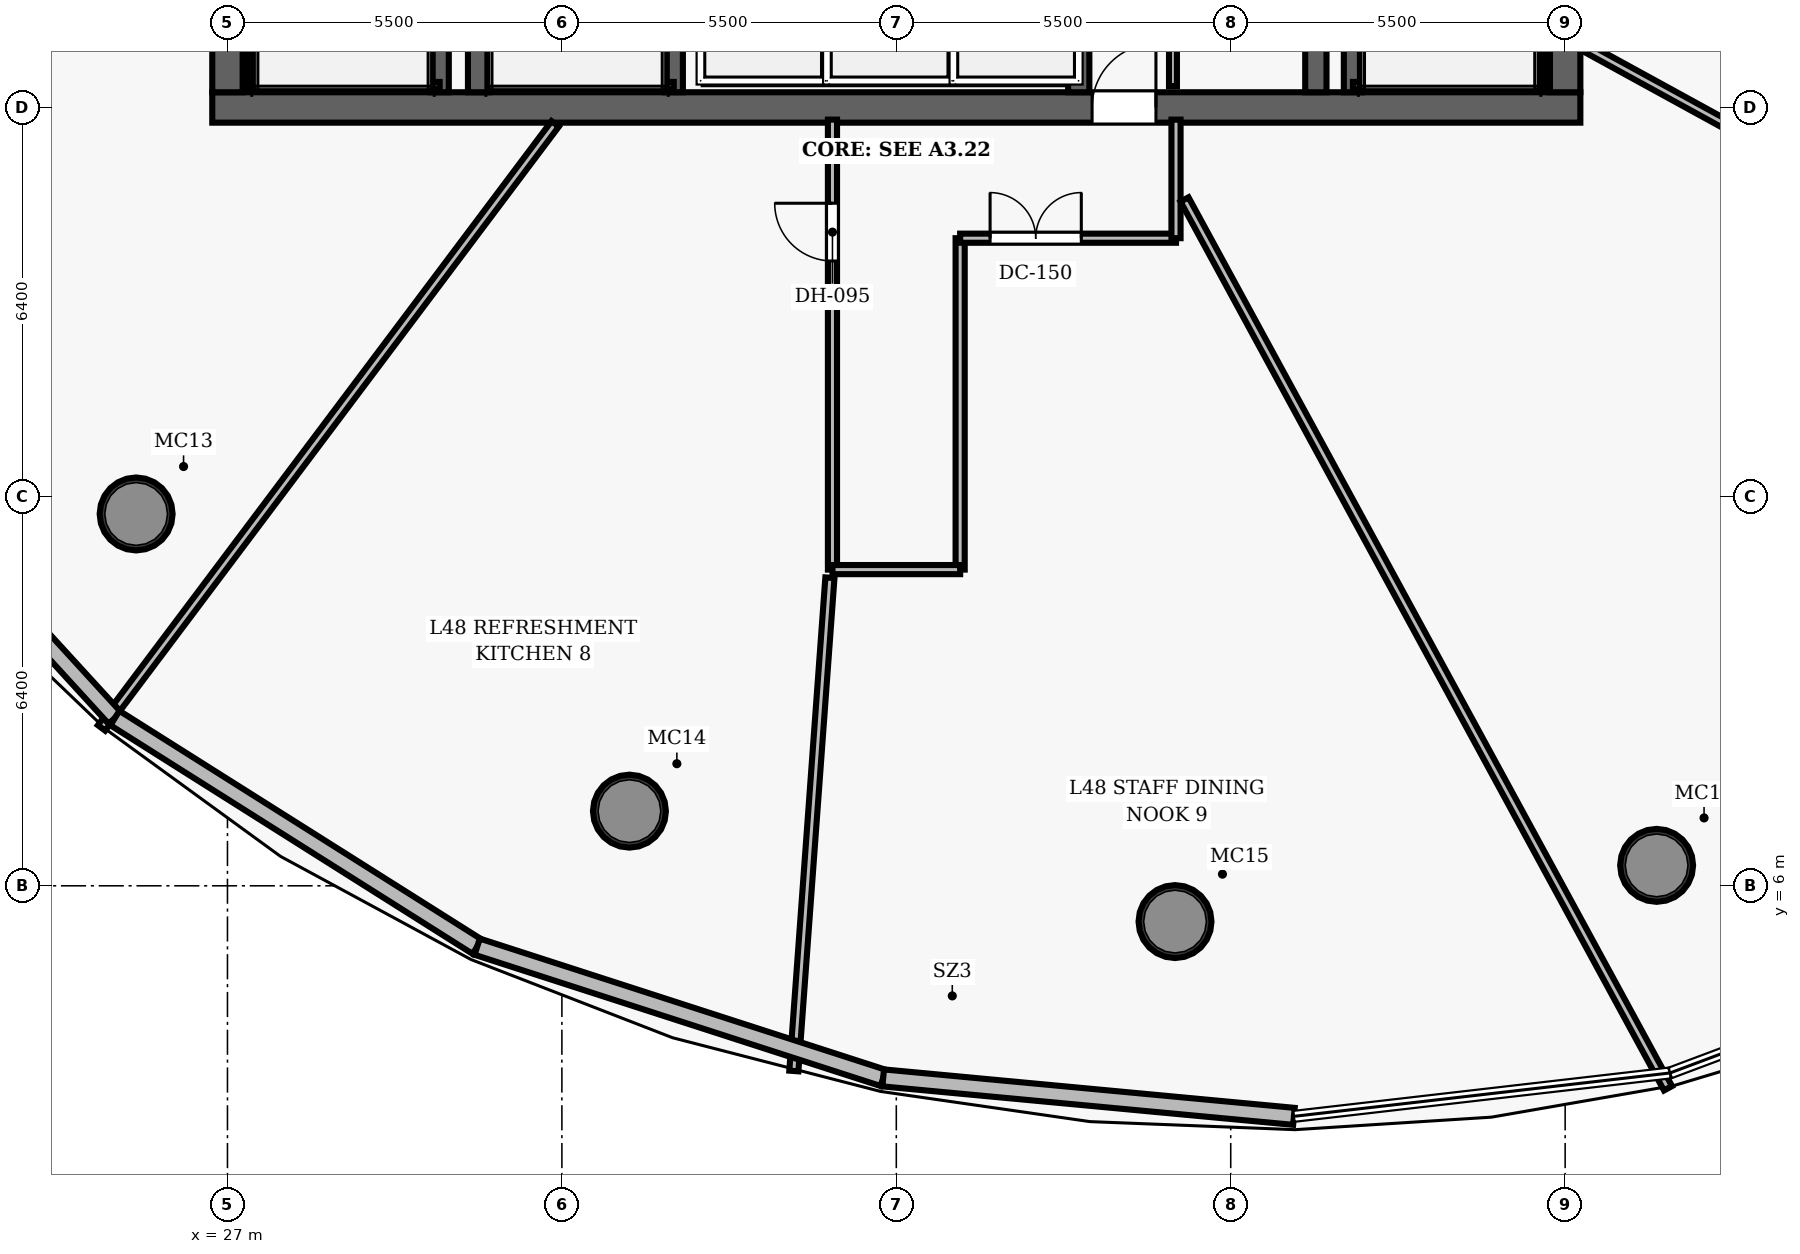
"""IFC4 building model, lengths in metres.
Left out: names, types, materials, properties, quantities, classifications, styles, units other than length and angle.
Written with IfcOpenShell. Run it as: python <this file> out.ifc"""

import sys

from ifc_helpers import new_model, si_unit, direction, frame, frame_2d, origin, origin_2d, place, context, subcontext, project, spatial, rectangle, hollow_circle, extrude, element, fill, save


model = new_model("IFC4")
c1 = context("Model", 3, precision=1e-05, world=origin(), true_north=direction((0.0, 1.0)))
c2 = subcontext(c1, "Body", "Model", "MODEL_VIEW")
j1 = project(units=[si_unit("LENGTHUNIT", "METRE"), si_unit("PLANEANGLEUNIT", "RADIAN")], contexts=[c1])
p1 = place(None, origin())
s1 = spatial("IfcSite", under=j1, at=p1, CompositionType="ELEMENT")
p2 = place(p1, origin())
s2 = spatial("IfcBuilding", under=s1, at=p2, CompositionType="ELEMENT")
p3 = place(p2, frame((0.0, 0.0, 190.45)))
s3 = spatial("IfcBuildingStorey", under=s2, at=p3, CompositionType="ELEMENT", Elevation=190.45)
p4 = place(p3, frame((26.75, 18.8, 0.0), z_axis=(0.0, 0.0, 1.0), x_axis=(1.0, 0.0, 0.0)))
e1 = element("IfcWall", 1, at=p4, inside=s3, PredefinedType="SHEAR", context=c2, shape_type="SweptSolid", body=[
    extrude(rectangle(XDim=22.5, YDim=0.5, at=frame_2d((11.25, 0.0))), origin(), (0.0, 0.0, 1.0), 3.85),
])
p5 = place(p4, frame((14.47, 0.0, 0.0)))
e2 = element("IfcOpeningElement", 2, at=p5, cuts=e1, PredefinedType="OPENING", context=c2, shape_type="SweptSolid", body=[
    extrude(rectangle(XDim=1.05, YDim=2.15, at=frame_2d((0.525, 1.075))), frame((0.0, 0.26, 0.0), z_axis=(0.0, -1.0, 0.0), x_axis=(1.0, 0.0, 0.0)), (0.0, 0.0, 1.0), 0.52),
])
p6 = place(p3, frame((27.0, 19.05, 0.0), z_axis=(0.0, 0.0, 1.0), x_axis=(0.0, 1.0, 0.0)))
e3 = element("IfcWall", 3, at=p6, inside=s3, PredefinedType="SHEAR", context=c2, shape_type="SweptSolid", body=[
    extrude(rectangle(XDim=13.9, YDim=0.5, at=frame_2d((6.95, 0.0))), origin(), (0.0, 0.0, 1.0), 3.85),
])
p7 = place(p6, frame((8.2, 0.0, 0.0)))
e4 = element("IfcOpeningElement", 4, at=p7, cuts=e3, PredefinedType="OPENING", context=c2, shape_type="SweptSolid", body=[
    extrude(rectangle(XDim=1.05, YDim=2.15, at=frame_2d((0.525, 1.075))), frame((0.0, 0.26, 0.0), z_axis=(0.0, -1.0, 0.0), x_axis=(1.0, 0.0, 0.0)), (0.0, 0.0, 1.0), 0.52),
])
p8 = place(p3, frame((49.0, 19.05, 0.0), z_axis=(0.0, 0.0, 1.0), x_axis=(0.0, 1.0, 0.0)))
e5 = element("IfcWall", 5, at=p8, inside=s3, PredefinedType="SHEAR", context=c2, shape_type="SweptSolid", body=[
    extrude(rectangle(XDim=13.9, YDim=0.5, at=frame_2d((6.95, 0.0))), origin(), (0.0, 0.0, 1.0), 3.85),
])
p9 = place(p8, frame((8.2, 0.0, 0.0)))
e6 = element("IfcOpeningElement", 6, at=p9, cuts=e5, PredefinedType="OPENING", context=c2, shape_type="SweptSolid", body=[
    extrude(rectangle(XDim=1.05, YDim=2.15, at=frame_2d((0.525, 1.075))), frame((0.0, 0.26, 0.0), z_axis=(0.0, -1.0, 0.0), x_axis=(1.0, 0.0, 0.0)), (0.0, 0.0, 1.0), 0.52),
])
for number, where, z_axis, x_axis in (
    (7, (31.13, 19.05, 0.0), (0.0, 0.0, 1.0), (0.0, 1.0, 0.0)),
    (8, (44.9, 19.05, 0.0), (0.0, 0.0, 1.0), (0.0, 1.0, 0.0)),
):
    element("IfcWall", number, at=place(p3, frame(where, z_axis=z_axis, x_axis=x_axis)), inside=s3, PredefinedType="SHEAR", context=c2, shape_type="SweptSolid", body=[
        extrude(rectangle(XDim=13.9, YDim=0.35, at=frame_2d((6.95, 0.0))), origin(), (0.0, 0.0, 1.0), 3.85),
    ])
for number, where, z_axis, x_axis in (
    (9, (25.498, 12.115, 0.0), (0.0, 0.0, 1.0), (1.0, 0.0, 0.0)),
    (10, (33.611, 7.228, 0.0), (0.0, 0.0, 1.0), (1.0, 0.0, 0.0)),
    (11, (42.584, 5.412, 0.0), (0.0, 0.0, 1.0), (1.0, 0.0, 0.0)),
    (12, (50.504, 6.336, 0.0), (0.0, 0.0, 1.0), (1.0, 0.0, 0.0)),
):
    element("IfcColumn", number, at=place(p3, frame(where, z_axis=z_axis, x_axis=x_axis)), inside=s3, PredefinedType="COLUMN", context=c2, shape_type="SweptSolid", body=[
        extrude(hollow_circle(Radius=0.6, WallThickness=0.05, at=origin_2d()), origin(), (0.0, 0.0, 1.0), 3.85),
    ])
p10 = place(p3, frame((30.49, 19.05, 0.0), z_axis=(0.0, 0.0, 1.0), x_axis=(0.0, 1.0, 0.0)))
e13 = element("IfcWall", 13, at=p10, inside=s3, PredefinedType="SHEAR", context=c2, shape_type="SweptSolid", body=[
    extrude(rectangle(XDim=7.5, YDim=0.3, at=frame_2d((3.75, 0.0))), origin(), (0.0, 0.0, 1.0), 3.85),
])
p11 = place(p3, frame((27.395, 19.1, 0.0), z_axis=(0.0, 0.0, 1.0), x_axis=(0.0, 1.0, 0.0)))
e14 = element("IfcWall", 14, at=p11, inside=s3, PredefinedType="SHEAR", context=c2, shape_type="SweptSolid", body=[
    extrude(rectangle(XDim=7.45, YDim=0.12, at=frame_2d((3.725, 0.0))), origin(), (0.0, 0.0, 1.0), 3.85),
])
p12 = place(p3, frame((27.395, 19.16, 0.0), z_axis=(0.0, 0.0, 1.0), x_axis=(1.0, 0.0, 0.0)))
e15 = element("IfcWall", 15, at=p12, inside=s3, PredefinedType="SHEAR", context=c2, shape_type="SweptSolid", body=[
    extrude(rectangle(XDim=3.095, YDim=0.12, at=frame_2d((1.547, 0.0))), origin(), (0.0, 0.0, 1.0), 3.85),
])
p13 = place(p3, frame((45.51, 19.05, 0.0), z_axis=(0.0, 0.0, 1.0), x_axis=(0.0, 1.0, 0.0)))
e16 = element("IfcWall", 16, at=p13, inside=s3, PredefinedType="SHEAR", context=c2, shape_type="SweptSolid", body=[
    extrude(rectangle(XDim=7.5, YDim=0.3, at=frame_2d((3.75, 0.0))), origin(), (0.0, 0.0, 1.0), 3.85),
])
p14 = place(p3, frame((48.605, 19.1, 0.0), z_axis=(0.0, 0.0, 1.0), x_axis=(0.0, 1.0, 0.0)))
e17 = element("IfcWall", 17, at=p14, inside=s3, PredefinedType="SHEAR", context=c2, shape_type="SweptSolid", body=[
    extrude(rectangle(XDim=7.45, YDim=0.12, at=frame_2d((3.725, 0.0))), origin(), (0.0, 0.0, 1.0), 3.85),
])
p15 = place(p3, frame((45.51, 19.16, 0.0), z_axis=(0.0, 0.0, 1.0), x_axis=(1.0, 0.0, 0.0)))
e18 = element("IfcWall", 18, at=p15, inside=s3, PredefinedType="SHEAR", context=c2, shape_type="SweptSolid", body=[
    extrude(rectangle(XDim=3.095, YDim=0.12, at=frame_2d((1.547, 0.0))), origin(), (0.0, 0.0, 1.0), 3.85),
])
p16 = place(p3, frame((34.34, 19.05, 0.0), z_axis=(0.0, 0.0, 1.0), x_axis=(0.0, 1.0, 0.0)))
e19 = element("IfcWall", 19, at=p16, inside=s3, PredefinedType="SHEAR", context=c2, shape_type="SweptSolid", body=[
    extrude(rectangle(XDim=7.5, YDim=0.3, at=frame_2d((3.75, 0.0))), origin(), (0.0, 0.0, 1.0), 3.85),
])
p17 = place(p3, frame((31.3, 19.16, 0.0), z_axis=(0.0, 0.0, 1.0), x_axis=(1.0, 0.0, 0.0)))
e20 = element("IfcWall", 20, at=p17, inside=s3, PredefinedType="SHEAR", context=c2, shape_type="SweptSolid", body=[
    extrude(rectangle(XDim=3.04, YDim=0.12, at=frame_2d((1.52, 0.0))), origin(), (0.0, 0.0, 1.0), 3.85),
])
p18 = place(p3, frame((41.0, 19.05, 0.0), z_axis=(0.0, 0.0, 1.0), x_axis=(0.0, 1.0, 0.0)))
e21 = element("IfcWall", 21, at=p18, inside=s3, PredefinedType="SHEAR", context=c2, shape_type="SweptSolid", body=[
    extrude(rectangle(XDim=2.08, YDim=0.35, at=frame_2d((1.04, 0.0))), origin(), (0.0, 0.0, 1.0), 3.035),
])
p19 = place(p3, frame((42.55, 19.15, 0.0), z_axis=(0.0, 0.0, 1.0), x_axis=(0.0, 1.0, 0.0)))
e22 = element("IfcWall", 22, at=p19, inside=s3, PredefinedType="PARTITIONING", context=c2, shape_type="SweptSolid", body=[
    extrude(rectangle(XDim=2.75, YDim=0.13, at=frame_2d((1.375, 0.0))), origin(), (0.0, 0.0, 1.0), 3.035),
])
p20 = place(p19, frame((0.65, 0.0, 0.0)))
e23 = element("IfcOpeningElement", 23, at=p20, cuts=e22, PredefinedType="OPENING", context=c2, shape_type="SweptSolid", body=[
    extrude(rectangle(XDim=0.85, YDim=2.1, at=frame_2d((0.425, 1.05))), frame((0.0, 0.075, 0.0), z_axis=(0.0, -1.0, 0.0), x_axis=(1.0, 0.0, 0.0)), (0.0, 0.0, 1.0), 0.15),
])
p21 = place(p3, frame((36.95, 11.2, 0.0), z_axis=(0.0, 0.0, 1.0), x_axis=(0.0, 1.0, 0.0)))
e24 = element("IfcWall", 24, at=p21, inside=s3, PredefinedType="PARTITIONING", context=c2, shape_type="SweptSolid", body=[
    extrude(rectangle(XDim=7.4, YDim=0.15, at=frame_2d((3.7, 0.0))), origin(), (0.0, 0.0, 1.0), 3.035),
])
p22 = place(p21, frame((5.075, 0.0, 0.0)))
e25 = element("IfcOpeningElement", 25, at=p22, cuts=e24, PredefinedType="OPENING", context=c2, shape_type="SweptSolid", body=[
    extrude(rectangle(XDim=0.95, YDim=2.15, at=frame_2d((0.475, 1.075))), frame((0.0, 0.085, 0.0), z_axis=(0.0, -1.0, 0.0), x_axis=(1.0, 0.0, 0.0)), (0.0, 0.0, 1.0), 0.17),
])
p23 = place(p3, frame((39.05, 11.2, 0.0), z_axis=(0.0, 0.0, 1.0), x_axis=(0.0, 1.0, 0.0)))
e26 = element("IfcWall", 26, at=p23, inside=s3, PredefinedType="PARTITIONING", context=c2, shape_type="SweptSolid", body=[
    extrude(rectangle(XDim=5.45, YDim=0.15, at=frame_2d((2.725, 0.0))), origin(), (0.0, 0.0, 1.0), 3.035),
])
p24 = place(p3, frame((39.05, 16.65, 0.0), z_axis=(0.0, 0.0, 1.0), x_axis=(1.0, 0.0, 0.0)))
e27 = element("IfcWall", 27, at=p24, inside=s3, PredefinedType="PARTITIONING", context=c2, shape_type="SweptSolid", body=[
    extrude(rectangle(XDim=3.55, YDim=0.15, at=frame_2d((1.775, 0.0))), origin(), (0.0, 0.0, 1.0), 3.035),
])
p25 = place(p24, frame((0.492, 0.0, 0.0)))
e28 = element("IfcOpeningElement", 28, at=p25, cuts=e27, PredefinedType="OPENING", context=c2, shape_type="SweptSolid", body=[
    extrude(rectangle(XDim=1.5, YDim=2.2, at=frame_2d((0.75, 1.1))), frame((0.0, 0.085, 0.0), z_axis=(0.0, -1.0, 0.0), x_axis=(1.0, 0.0, 0.0)), (0.0, 0.0, 1.0), 0.17),
])
p26 = place(p3, frame((42.6, 16.65, 0.0), z_axis=(0.0, 0.0, 1.0), x_axis=(0.0, 1.0, 0.0)))
e29 = element("IfcWall", 29, at=p26, inside=s3, PredefinedType="PARTITIONING", context=c2, shape_type="SweptSolid", body=[
    extrude(rectangle(XDim=1.95, YDim=0.15, at=frame_2d((0.975, 0.0))), origin(), (0.0, 0.0, 1.0), 3.035),
])
p27 = place(p3, frame((36.95, 11.2, 0.0), z_axis=(0.0, 0.0, 1.0), x_axis=(1.0, 0.0, 0.0)))
e30 = element("IfcWall", 30, at=p27, inside=s3, PredefinedType="PARTITIONING", context=c2, shape_type="SweptSolid", body=[
    extrude(rectangle(XDim=2.1, YDim=0.15, at=frame_2d((1.05, 0.0))), origin(), (0.0, 0.0, 1.0), 3.035),
])
p28 = place(p3, frame((26.73, 21.817, 0.0), z_axis=(0.0, 0.0, 1.0), x_axis=(-0.937500713905, -0.347983349353, 0.0)))
e31 = element("IfcWall", 31, at=p28, inside=s3, PredefinedType="PARTITIONING", context=c2, shape_type="SweptSolid", body=[
    extrude(rectangle(XDim=9.745, YDim=0.15, at=frame_2d((4.873, 0.0))), origin(), (0.0, 0.0, 1.0), 3.035),
])
p29 = place(p3, frame((32.389, 18.53, 0.0), z_axis=(0.0, 0.0, 1.0), x_axis=(-0.600540681627, -0.79959420315, 0.0)))
e32 = element("IfcWall", 32, at=p29, inside=s3, PredefinedType="PARTITIONING", context=c2, shape_type="SweptSolid", body=[
    extrude(rectangle(XDim=12.423, YDim=0.15, at=frame_2d((6.212, 0.0))), origin(), (0.0, 0.0, 1.0), 3.035),
])
p30 = place(p3, frame((36.908, 11.066, 0.0), z_axis=(0.0, 0.0, 1.0), x_axis=(-0.072938500315, -0.997336440311, 0.0)))
e33 = element("IfcWall", 33, at=p30, inside=s3, PredefinedType="PARTITIONING", context=c2, shape_type="SweptSolid", body=[
    extrude(rectangle(XDim=8.134, YDim=0.15, at=frame_2d((4.067, 0.0))), origin(), (0.0, 0.0, 1.0), 3.035),
])
p31 = place(p3, frame((42.74, 17.287, 0.0), z_axis=(0.0, 0.0, 1.0), x_axis=(0.477857761116, -0.878437226067, 0.0)))
e34 = element("IfcWall", 34, at=p31, inside=s3, PredefinedType="PARTITIONING", context=c2, shape_type="SweptSolid", body=[
    extrude(rectangle(XDim=16.64, YDim=0.15, at=frame_2d((8.32, 0.0))), origin(), (0.0, 0.0, 1.0), 3.035),
])
p32 = place(p3, frame((49.27, 19.823, 0.0), z_axis=(0.0, 0.0, 1.0), x_axis=(0.876914727702, -0.48064598234, 0.0)))
e35 = element("IfcWall", 35, at=p32, inside=s3, PredefinedType="PARTITIONING", context=c2, shape_type="SweptSolid", body=[
    extrude(rectangle(XDim=14.924, YDim=0.15, at=frame_2d((7.462, 0.0))), origin(), (0.0, 0.0, 1.0), 3.035),
])
p33 = place(p3, frame((25.148, 8.759, 0.0), z_axis=(0.0, 0.0, 1.0), x_axis=(-0.674997810136, 0.737819731582, 0.0)))
e36 = element("IfcWall", 36, at=p33, inside=s3, PredefinedType="SOLIDWALL", context=c2, shape_type="SweptSolid", body=[
    extrude(rectangle(XDim=7.046, YDim=0.28, at=frame_2d((3.523, 0.0))), origin(), (0.0, 0.0, 1.0), 3.62),
])
p34 = place(p3, frame((31.107, 4.999, 0.0), z_axis=(0.0, 0.0, 1.0), x_axis=(-0.845687288616, 0.533678751566, 0.0)))
e37 = element("IfcWall", 37, at=p34, inside=s3, PredefinedType="SOLIDWALL", context=c2, shape_type="SweptSolid", body=[
    extrude(rectangle(XDim=7.045, YDim=0.28, at=frame_2d((3.523, 0.0))), origin(), (0.0, 0.0, 1.0), 3.62),
])
p35 = place(p3, frame((37.784, 2.841, 0.0), z_axis=(0.0, 0.0, 1.0), x_axis=(-0.951544860773, 0.307509963964, 0.0)))
e38 = element("IfcWall", 38, at=p35, inside=s3, PredefinedType="SOLIDWALL", context=c2, shape_type="SweptSolid", body=[
    extrude(rectangle(XDim=7.018, YDim=0.28, at=frame_2d((3.509, 0.0))), origin(), (0.0, 0.0, 1.0), 3.62),
])
p36 = place(p3, frame((44.539, 2.208, 0.0), z_axis=(0.0, 0.0, 1.0), x_axis=(-0.995647488007, 0.093199139613, 0.0)))
e39 = element("IfcWall", 39, at=p36, inside=s3, PredefinedType="SOLIDWALL", context=c2, shape_type="SweptSolid", body=[
    extrude(rectangle(XDim=6.785, YDim=0.28, at=frame_2d((3.392, 0.0))), origin(), (0.0, 0.0, 1.0), 3.62),
])
p37 = place(p5, origin())
e40 = element("IfcDoor", 40, at=p37, inside=s3, OperationType="SINGLE_SWING_RIGHT", PredefinedType="DOOR", context=c2, shape_type="SweptSolid", body=[
    extrude(rectangle(XDim=1.05, YDim=2.15, at=frame_2d((0.525, 1.075))), frame((0.0, 0.025, 0.0), z_axis=(0.0, -1.0, 0.0), x_axis=(1.0, 0.0, 0.0)), (0.0, 0.0, 1.0), 0.05),
])
fill(e2, e40)
p38 = place(p22, origin())
e41 = element("IfcDoor", 41, at=p38, inside=s3, OperationType="SINGLE_SWING_RIGHT", PredefinedType="DOOR", context=c2, shape_type="SweptSolid", body=[
    extrude(rectangle(XDim=0.95, YDim=2.15, at=frame_2d((0.475, 1.075))), frame((0.0, 0.025, 0.0), z_axis=(0.0, -1.0, 0.0), x_axis=(1.0, 0.0, 0.0)), (0.0, 0.0, 1.0), 0.05),
])
fill(e25, e41)
p39 = place(p25, origin())
e42 = element("IfcDoor", 42, at=p39, inside=s3, OperationType="DOUBLE_DOOR_SINGLE_SWING", PredefinedType="DOOR", context=c2, shape_type="SweptSolid", body=[
    extrude(rectangle(XDim=1.5, YDim=2.2, at=frame_2d((0.75, 1.1))), frame((0.0, 0.025, 0.0), z_axis=(0.0, -1.0, 0.0), x_axis=(1.0, 0.0, 0.0)), (0.0, 0.0, 1.0), 0.05),
])
fill(e28, e42)
save(model, sys.argv[1])
